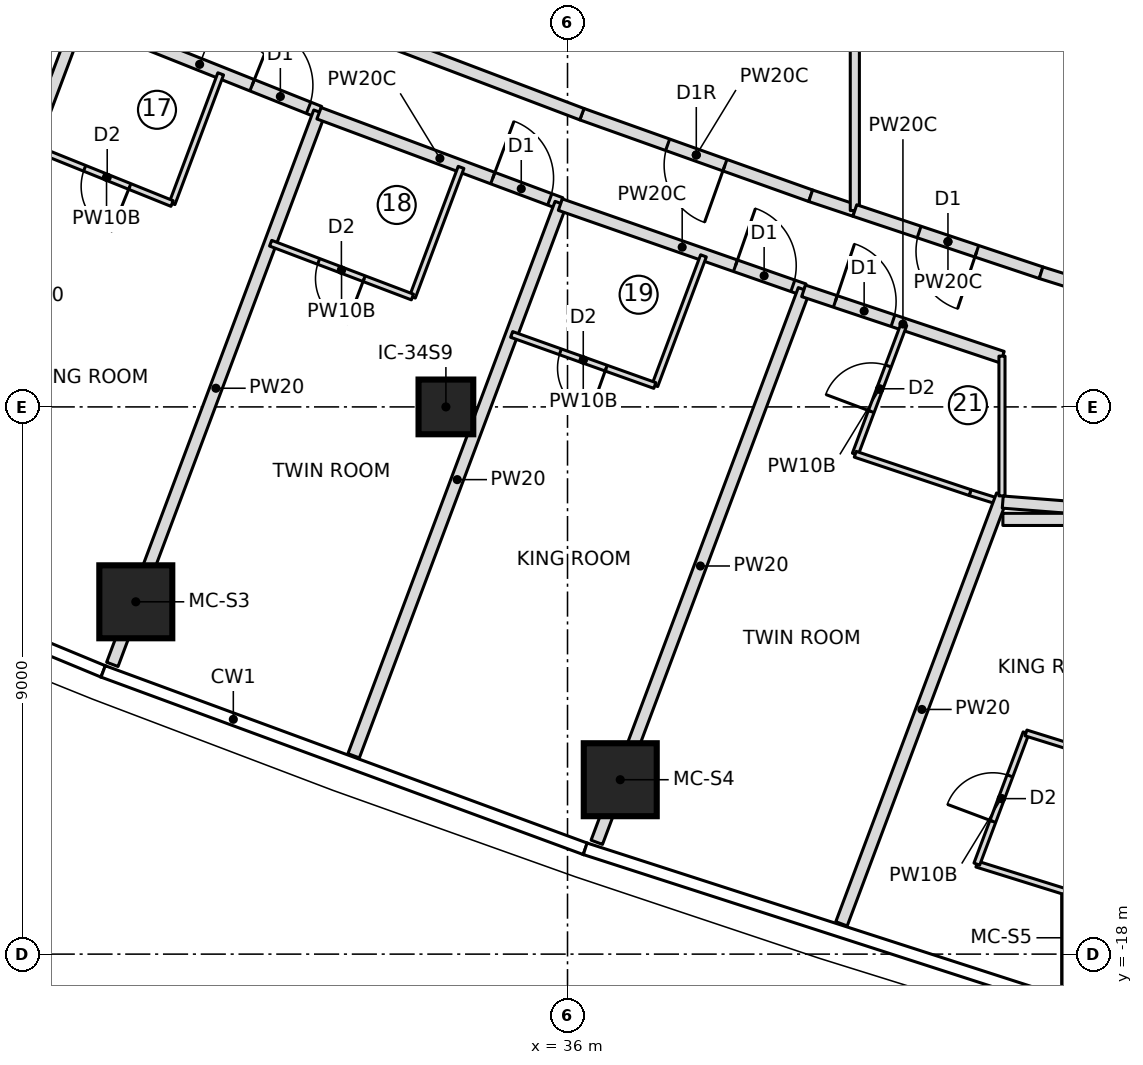
"""IFC4 building model, lengths in metres.
Left out: names, types, materials, properties, quantities, classifications, styles, units other than length and angle.
Written with IfcOpenShell. Run it as: python <this file> out.ifc"""

import sys

from ifc_helpers import new_model, si_unit, direction, frame, frame_2d, origin, origin_2d, place, context, subcontext, project, spatial, rectangle, extrude, element, fill, save


model = new_model("IFC4")
c1 = context("Model", 3, precision=1e-05, world=origin(), true_north=direction((0.0, 1.0)))
c2 = subcontext(c1, "Body", "Model", "MODEL_VIEW")
j1 = project(units=[si_unit("LENGTHUNIT", "METRE"), si_unit("PLANEANGLEUNIT", "RADIAN")], contexts=[c1])
p1 = place(None, origin())
s1 = spatial("IfcSite", under=j1, at=p1, CompositionType="ELEMENT")
p2 = place(p1, origin())
s2 = spatial("IfcBuilding", under=s1, at=p2, CompositionType="ELEMENT")
p3 = place(p2, frame((0.0, 0.0, 252.75)))
s3 = spatial("IfcBuildingStorey", under=s2, at=p3, CompositionType="ELEMENT", Elevation=252.75)
for number, where, z_axis, x_axis in (
    (1, (28.9, -12.205, 0.0), (0.0, 0.0, 1.0), (1.0, 0.0, 0.0)),
    (2, (36.867, -15.132, 0.0), (0.0, 0.0, 1.0), (1.0, 0.0, 0.0)),
):
    element("IfcColumn", number, at=place(p3, frame(where, z_axis=z_axis, x_axis=x_axis)), inside=s3, PredefinedType="COLUMN", context=c2, shape_type="SweptSolid", body=[
        extrude(rectangle(XDim=1.2, YDim=1.2, at=origin_2d()), origin(), (0.0, 0.0, 1.0), 3.55),
    ])
p4 = place(p3, frame((34.0, -9.0, 0.0), z_axis=(0.0, 0.0, 1.0), x_axis=(1.0, 0.0, 0.0)))
e3 = element("IfcColumn", 3, at=p4, inside=s3, PredefinedType="COLUMN", context=c2, shape_type="SweptSolid", body=[
    extrude(rectangle(XDim=0.9, YDim=0.9, at=origin_2d()), origin(), (0.0, 0.0, 1.0), 3.55),
])
p5 = place(p3, frame((24.578, -11.652, 0.0), z_axis=(0.0, 0.0, 1.0), x_axis=(0.351140219871, 0.936322885542, 0.0)))
e4 = element("IfcWall", 4, at=p5, inside=s3, PredefinedType="PARTITIONING", context=c2, shape_type="SweptSolid", body=[
    extrude(rectangle(XDim=9.568, YDim=0.2, at=frame_2d((4.784, 0.0))), origin(), (0.0, 0.0, 1.0), 3.15),
])
p6 = place(p3, frame((27.98, -2.581, 0.0), z_axis=(0.0, 0.0, 1.0), x_axis=(0.928920552813, -0.370279092795, 0.0)))
e5 = element("IfcWall", 5, at=p6, inside=s3, PredefinedType="PARTITIONING", context=c2, shape_type="SweptSolid", body=[
    extrude(rectangle(XDim=4.242, YDim=0.2, at=frame_2d((2.121, 0.0))), origin(), (0.0, 0.0, 1.0), 3.15),
])
p7 = place(p6, frame((3.05, 0.0, 0.0)))
e6 = element("IfcOpeningElement", 6, at=p7, cuts=e5, PredefinedType="OPENING", context=c2, shape_type="SweptSolid", body=[
    extrude(rectangle(XDim=1.0, YDim=2.1, at=frame_2d((0.5, 1.05))), frame((0.0, 0.11, 0.0), z_axis=(0.0, -1.0, 0.0), x_axis=(1.0, 0.0, 0.0)), (0.0, 0.0, 1.0), 0.22),
])
p8 = place(p3, frame((30.296, -3.522, 0.0), z_axis=(0.0, 0.0, 1.0), x_axis=(-0.351099944253, -0.936337988734, 0.0)))
e7 = element("IfcWall", 7, at=p8, inside=s3, PredefinedType="PARTITIONING", context=c2, shape_type="SweptSolid", body=[
    extrude(rectangle(XDim=2.277, YDim=0.1, at=frame_2d((1.139, 0.0))), origin(), (0.0, 0.0, 1.0), 3.15),
])
p9 = place(p3, frame((29.497, -5.655, 0.0), z_axis=(0.0, 0.0, 1.0), x_axis=(-0.927619412923, 0.373526739028, 0.0)))
e8 = element("IfcWall", 8, at=p9, inside=s3, PredefinedType="PARTITIONING", context=c2, shape_type="SweptSolid", body=[
    extrude(rectangle(XDim=2.324, YDim=0.1, at=frame_2d((1.162, 0.0))), origin(), (0.0, 0.0, 1.0), 3.15),
])
p10 = place(p9, frame((0.75, 0.0, 0.0)))
e9 = element("IfcOpeningElement", 9, at=p10, cuts=e8, PredefinedType="OPENING", context=c2, shape_type="SweptSolid", body=[
    extrude(rectangle(XDim=0.8, YDim=2.1, at=frame_2d((0.4, 1.05))), frame((0.0, 0.06, 0.0), z_axis=(0.0, -1.0, 0.0), x_axis=(1.0, 0.0, 0.0)), (0.0, 0.0, 1.0), 0.12),
])
p11 = place(p3, frame((28.514, -13.235, 0.0), z_axis=(0.0, 0.0, 1.0), x_axis=(0.351126199585, 0.936328143316, 0.0)))
e10 = element("IfcWall", 10, at=p11, inside=s3, PredefinedType="PARTITIONING", context=c2, shape_type="SweptSolid", body=[
    extrude(rectangle(XDim=9.701, YDim=0.2, at=frame_2d((4.851, 0.0))), origin(), (0.0, 0.0, 1.0), 3.15),
])
p12 = place(p3, frame((31.913, -4.17, 0.0), z_axis=(0.0, 0.0, 1.0), x_axis=(0.936848300955, -0.349735987565, 0.0)))
e11 = element("IfcWall", 11, at=p12, inside=s3, PredefinedType="PARTITIONING", context=c2, shape_type="SweptSolid", body=[
    extrude(rectangle(XDim=4.244, YDim=0.2, at=frame_2d((2.122, 0.0))), origin(), (0.0, 0.0, 1.0), 3.15),
])
p13 = place(p12, frame((3.05, 0.0, 0.0)))
e12 = element("IfcOpeningElement", 12, at=p13, cuts=e11, PredefinedType="OPENING", context=c2, shape_type="SweptSolid", body=[
    extrude(rectangle(XDim=1.0, YDim=2.1, at=frame_2d((0.5, 1.05))), frame((0.0, 0.11, 0.0), z_axis=(0.0, -1.0, 0.0), x_axis=(1.0, 0.0, 0.0)), (0.0, 0.0, 1.0), 0.22),
])
p14 = place(p3, frame((34.25, -5.061, 0.0), z_axis=(0.0, 0.0, 1.0), x_axis=(-0.351135191353, -0.936324771323, 0.0)))
e13 = element("IfcWall", 13, at=p14, inside=s3, PredefinedType="PARTITIONING", context=c2, shape_type="SweptSolid", body=[
    extrude(rectangle(XDim=2.277, YDim=0.1, at=frame_2d((1.139, 0.0))), origin(), (0.0, 0.0, 1.0), 3.15),
])
p15 = place(p3, frame((33.45, -7.193, 0.0), z_axis=(0.0, 0.0, 1.0), x_axis=(-0.93495051617, 0.354778145202, 0.0)))
e14 = element("IfcWall", 14, at=p15, inside=s3, PredefinedType="PARTITIONING", context=c2, shape_type="SweptSolid", body=[
    extrude(rectangle(XDim=2.495, YDim=0.1, at=frame_2d((1.247, 0.0))), origin(), (0.0, 0.0, 1.0), 3.15),
])
p16 = place(p15, frame((0.85, 0.0, 0.0)))
e15 = element("IfcOpeningElement", 15, at=p16, cuts=e14, PredefinedType="OPENING", context=c2, shape_type="SweptSolid", body=[
    extrude(rectangle(XDim=0.8, YDim=2.1, at=frame_2d((0.4, 1.05))), frame((0.0, 0.06, 0.0), z_axis=(0.0, -1.0, 0.0), x_axis=(1.0, 0.0, 0.0)), (0.0, 0.0, 1.0), 0.12),
])
p17 = place(p3, frame((32.483, -14.738, 0.0), z_axis=(0.0, 0.0, 1.0), x_axis=(0.351117925717, 0.936331246002, 0.0)))
e16 = element("IfcWall", 16, at=p17, inside=s3, PredefinedType="PARTITIONING", context=c2, shape_type="SweptSolid", body=[
    extrude(rectangle(XDim=9.701, YDim=0.2, at=frame_2d((4.851, 0.0))), origin(), (0.0, 0.0, 1.0), 3.15),
])
p18 = place(p3, frame((35.882, -5.673, 0.0), z_axis=(0.0, 0.0, 1.0), x_axis=(0.944107376821, -0.329638075823, 0.0)))
e17 = element("IfcWall", 17, at=p18, inside=s3, PredefinedType="PARTITIONING", context=c2, shape_type="SweptSolid", body=[
    extrude(rectangle(XDim=4.245, YDim=0.2, at=frame_2d((2.122, 0.0))), origin(), (0.0, 0.0, 1.0), 3.15),
])
p19 = place(p18, frame((3.05, 0.0, 0.0)))
e18 = element("IfcOpeningElement", 18, at=p19, cuts=e17, PredefinedType="OPENING", context=c2, shape_type="SweptSolid", body=[
    extrude(rectangle(XDim=1.0, YDim=2.1, at=frame_2d((0.5, 1.05))), frame((0.0, 0.11, 0.0), z_axis=(0.0, -1.0, 0.0), x_axis=(1.0, 0.0, 0.0)), (0.0, 0.0, 1.0), 0.22),
])
p20 = place(p3, frame((38.236, -6.516, 0.0), z_axis=(0.0, 0.0, 1.0), x_axis=(-0.351229183496, -0.936289517543, 0.0)))
e19 = element("IfcWall", 19, at=p20, inside=s3, PredefinedType="PARTITIONING", context=c2, shape_type="SweptSolid", body=[
    extrude(rectangle(XDim=2.277, YDim=0.1, at=frame_2d((1.139, 0.0))), origin(), (0.0, 0.0, 1.0), 3.15),
])
p21 = place(p3, frame((37.436, -8.648, 0.0), z_axis=(0.0, 0.0, 1.0), x_axis=(-0.941896455552, 0.335903359641, 0.0)))
e20 = element("IfcWall", 20, at=p21, inside=s3, PredefinedType="PARTITIONING", context=c2, shape_type="SweptSolid", body=[
    extrude(rectangle(XDim=2.5, YDim=0.1, at=frame_2d((1.25, 0.0))), origin(), (0.0, 0.0, 1.0), 3.15),
])
p22 = place(p21, frame((0.85, 0.0, 0.0)))
e21 = element("IfcOpeningElement", 21, at=p22, cuts=e20, PredefinedType="OPENING", context=c2, shape_type="SweptSolid", body=[
    extrude(rectangle(XDim=0.8, YDim=2.1, at=frame_2d((0.4, 1.05))), frame((0.0, 0.06, 0.0), z_axis=(0.0, -1.0, 0.0), x_axis=(1.0, 0.0, 0.0)), (0.0, 0.0, 1.0), 0.12),
])
p23 = place(p3, frame((36.481, -16.161, 0.0), z_axis=(0.0, 0.0, 1.0), x_axis=(0.35112895446, 0.936327110224, 0.0)))
e22 = element("IfcWall", 22, at=p23, inside=s3, PredefinedType="PARTITIONING", context=c2, shape_type="SweptSolid", body=[
    extrude(rectangle(XDim=9.706, YDim=0.2, at=frame_2d((4.853, 0.0))), origin(), (0.0, 0.0, 1.0), 3.15),
])
p24 = place(p3, frame((39.882, -7.091, 0.0), z_axis=(0.0, 0.0, 1.0), x_axis=(0.948477584784, -0.316844238013, 0.0)))
e23 = element("IfcWall", 23, at=p24, inside=s3, PredefinedType="PARTITIONING", context=c2, shape_type="SweptSolid", body=[
    extrude(rectangle(XDim=3.445, YDim=0.2, at=frame_2d((1.723, 0.0))), origin(), (0.0, 0.0, 1.0), 3.15),
])
p25 = place(p24, frame((0.55, 0.0, 0.0)))
e24 = element("IfcOpeningElement", 24, at=p25, cuts=e23, PredefinedType="OPENING", context=c2, shape_type="SweptSolid", body=[
    extrude(rectangle(XDim=1.0, YDim=2.1, at=frame_2d((0.5, 1.05))), frame((0.0, 0.11, 0.0), z_axis=(0.0, -1.0, 0.0), x_axis=(1.0, 0.0, 0.0)), (0.0, 0.0, 1.0), 0.22),
])
p26 = place(p3, frame((40.732, -9.779, 0.0), z_axis=(0.0, 0.0, 1.0), x_axis=(0.351146927505, 0.936320370014, 0.0)))
e25 = element("IfcWall", 25, at=p26, inside=s3, PredefinedType="PARTITIONING", context=c2, shape_type="SweptSolid", body=[
    extrude(rectangle(XDim=2.278, YDim=0.1, at=frame_2d((1.139, 0.0))), origin(), (0.0, 0.0, 1.0), 3.15),
])
p27 = place(p26, frame((0.75, 0.0, 0.0)))
e26 = element("IfcOpeningElement", 26, at=p27, cuts=e25, PredefinedType="OPENING", context=c2, shape_type="SweptSolid", body=[
    extrude(rectangle(XDim=0.8, YDim=2.1, at=frame_2d((0.4, 1.05))), frame((0.0, 0.06, 0.0), z_axis=(0.0, -1.0, 0.0), x_axis=(1.0, 0.0, 0.0)), (0.0, 0.0, 1.0), 0.12),
])
p28 = place(p3, frame((43.108, -10.562, 0.0), z_axis=(0.0, 0.0, 1.0), x_axis=(-0.954624465478, 0.297812239356, 0.0)))
e27 = element("IfcWall", 27, at=p28, inside=s3, PredefinedType="PARTITIONING", context=c2, shape_type="SweptSolid", body=[
    extrude(rectangle(XDim=0.511, YDim=0.1, at=frame_2d((0.255, 0.0))), origin(), (0.0, 0.0, 1.0), 3.15),
])
p29 = place(p3, frame((42.621, -10.409, 0.0), z_axis=(0.0, 0.0, 1.0), x_axis=(-0.948499248693, 0.316779379426, 0.0)))
e28 = element("IfcWall", 28, at=p29, inside=s3, PredefinedType="PARTITIONING", context=c2, shape_type="SweptSolid", body=[
    extrude(rectangle(XDim=1.991, YDim=0.1, at=frame_2d((0.996, 0.0))), origin(), (0.0, 0.0, 1.0), 3.15),
])
p30 = place(p3, frame((40.506, -17.501, 0.0), z_axis=(0.0, 0.0, 1.0), x_axis=(0.351119888923, 0.936330509811, 0.0)))
e29 = element("IfcWall", 29, at=p30, inside=s3, PredefinedType="PARTITIONING", context=c2, shape_type="SweptSolid", body=[
    extrude(rectangle(XDim=7.531, YDim=0.2, at=frame_2d((3.766, 0.0))), origin(), (0.0, 0.0, 1.0), 3.15),
])
p31 = place(p3, frame((44.177, -18.501, 0.0), z_axis=(0.0, 0.0, 1.0), x_axis=(0.0, 1.0, 0.0)))
e30 = element("IfcWall", 30, at=p31, inside=s3, PredefinedType="PARTITIONING", context=c2, shape_type="SweptSolid", body=[
    extrude(rectangle(XDim=1.531, YDim=0.1, at=frame_2d((0.766, 0.0))), origin(), (0.0, 0.0, 1.0), 3.15),
])
p32 = place(p3, frame((44.177, -16.97, 0.0), z_axis=(0.0, 0.0, 1.0), x_axis=(-0.954631901927, 0.297788401091, 0.0)))
e31 = element("IfcWall", 31, at=p32, inside=s3, PredefinedType="PARTITIONING", context=c2, shape_type="SweptSolid", body=[
    extrude(rectangle(XDim=1.514, YDim=0.1, at=frame_2d((0.757, 0.0))), origin(), (0.0, 0.0, 1.0), 3.15),
])
p33 = place(p3, frame((42.731, -16.519, 0.0), z_axis=(0.0, 0.0, 1.0), x_axis=(0.351111827312, 0.936333532841, 0.0)))
e32 = element("IfcWall", 32, at=p33, inside=s3, PredefinedType="PARTITIONING", context=c2, shape_type="SweptSolid", body=[
    extrude(rectangle(XDim=2.304, YDim=0.1, at=frame_2d((1.152, 0.0))), origin(), (0.0, 0.0, 1.0), 3.15),
])
p34 = place(p33, frame((0.75, 0.0, 0.0)))
e33 = element("IfcOpeningElement", 33, at=p34, cuts=e32, PredefinedType="OPENING", context=c2, shape_type="SweptSolid", body=[
    extrude(rectangle(XDim=0.8, YDim=2.1, at=frame_2d((0.4, 1.05))), frame((0.0, 0.06, 0.0), z_axis=(0.0, -1.0, 0.0), x_axis=(1.0, 0.0, 0.0)), (0.0, 0.0, 1.0), 0.12),
])
p35 = place(p3, frame((43.54, -14.362, 0.0), z_axis=(0.0, 0.0, 1.0), x_axis=(0.954642821531, -0.297753393432, 0.0)))
e34 = element("IfcWall", 34, at=p35, inside=s3, PredefinedType="PARTITIONING", context=c2, shape_type="SweptSolid", body=[
    extrude(rectangle(XDim=2.052, YDim=0.1, at=frame_2d((1.026, 0.0))), origin(), (0.0, 0.0, 1.0), 3.15),
])
p36 = place(p3, frame((39.999, -5.527, 0.0), z_axis=(0.0, 0.0, 1.0), x_axis=(-0.941909090846, 0.335867927288, 0.0)))
e35 = element("IfcWall", 35, at=p36, inside=s3, PredefinedType="PARTITIONING", context=c2, shape_type="SweptSolid", body=[
    extrude(rectangle(XDim=3.995, YDim=0.2, at=frame_2d((1.998, 0.0))), origin(), (0.0, 0.0, 1.0), 3.15),
])
p37 = place(p36, frame((1.498, 0.0, 0.0)))
e36 = element("IfcOpeningElement", 36, at=p37, cuts=e35, PredefinedType="OPENING", context=c2, shape_type="SweptSolid", body=[
    extrude(rectangle(XDim=1.0, YDim=2.1, at=frame_2d((0.5, 1.05))), frame((0.0, 0.11, 0.0), z_axis=(0.0, -1.0, 0.0), x_axis=(1.0, 0.0, 0.0)), (0.0, 0.0, 1.0), 0.22),
])
p38 = place(p3, frame((40.725, -5.77, 0.0), z_axis=(0.0, 0.0, 1.0), x_axis=(-0.948395804395, 0.317088943683, 0.0)))
e37 = element("IfcWall", 37, at=p38, inside=s3, PredefinedType="PARTITIONING", context=c2, shape_type="SweptSolid", body=[
    extrude(rectangle(XDim=0.765, YDim=0.2, at=frame_2d((0.383, 0.0))), origin(), (0.0, 0.0, 1.0), 3.15),
])
p39 = place(p3, frame((36.236, -4.186, 0.0), z_axis=(0.0, 0.0, 1.0), x_axis=(-0.934953584606, 0.354770058816, 0.0)))
e38 = element("IfcWall", 38, at=p39, inside=s3, PredefinedType="PARTITIONING", context=c2, shape_type="SweptSolid", body=[
    extrude(rectangle(XDim=3.622, YDim=0.2, at=frame_2d((1.811, 0.0))), origin(), (0.0, 0.0, 1.0), 3.15),
])
p40 = place(p3, frame((40.725, -5.77, 0.0), z_axis=(0.0, 0.0, 1.0), x_axis=(0.0, 1.0, 0.0)))
e39 = element("IfcWall", 39, at=p40, inside=s3, PredefinedType="PARTITIONING", context=c2, shape_type="SweptSolid", body=[
    extrude(rectangle(XDim=11.54, YDim=0.15, at=frame_2d((5.77, 0.0))), origin(), (0.0, 0.0, 1.0), 3.15),
])
p41 = place(p3, frame((43.788, -6.793, 0.0), z_axis=(0.0, 0.0, 1.0), x_axis=(-0.948486568618, 0.316817343515, 0.0)))
e40 = element("IfcWall", 40, at=p41, inside=s3, PredefinedType="PARTITIONING", context=c2, shape_type="SweptSolid", body=[
    extrude(rectangle(XDim=3.229, YDim=0.2, at=frame_2d((1.615, 0.0))), origin(), (0.0, 0.0, 1.0), 3.15),
])
p42 = place(p41, frame((1.115, 0.0, 0.0)))
e41 = element("IfcOpeningElement", 41, at=p42, cuts=e40, PredefinedType="OPENING", context=c2, shape_type="SweptSolid", body=[
    extrude(rectangle(XDim=1.0, YDim=2.1, at=frame_2d((0.5, 1.05))), frame((0.0, 0.11, 0.0), z_axis=(0.0, -1.0, 0.0), x_axis=(1.0, 0.0, 0.0)), (0.0, 0.0, 1.0), 0.22),
])
p43 = place(p3, frame((44.933, -7.15, 0.0), z_axis=(0.0, 0.0, 1.0), x_axis=(-0.954693570678, 0.29759063511, 0.0)))
e42 = element("IfcWall", 42, at=p43, inside=s3, PredefinedType="PARTITIONING", context=c2, shape_type="SweptSolid", body=[
    extrude(rectangle(XDim=1.198, YDim=0.2, at=frame_2d((0.599, 0.0))), origin(), (0.0, 0.0, 1.0), 3.15),
])
p44 = place(p3, frame((43.145, -8.165, 0.0), z_axis=(0.0, 0.0, 1.0), x_axis=(0.0, -1.0, 0.0)))
e43 = element("IfcWall", 43, at=p44, inside=s3, PredefinedType="PARTITIONING", context=c2, shape_type="SweptSolid", body=[
    extrude(rectangle(XDim=2.298, YDim=0.1, at=frame_2d((1.149, 0.0))), origin(), (0.0, 0.0, 1.0), 3.15),
])
p45 = place(p3, frame((43.158, -10.565, 0.0), z_axis=(0.0, 0.0, 1.0), x_axis=(0.996940593543, -0.078162989617, 0.0)))
e44 = element("IfcWall", 44, at=p45, inside=s3, PredefinedType="PARTITIONING", context=c2, shape_type="SweptSolid", body=[
    extrude(rectangle(XDim=3.704, YDim=0.2, at=frame_2d((1.852, 0.0))), origin(), (0.0, 0.0, 1.0), 3.15),
])
p46 = place(p45, frame((1.327, 0.0, 0.0)))
e45 = element("IfcOpeningElement", 45, at=p46, cuts=e44, PredefinedType="OPENING", context=c2, shape_type="SweptSolid", body=[
    extrude(rectangle(XDim=1.0, YDim=2.1, at=frame_2d((0.5, 1.05))), frame((0.0, 0.11, 0.0), z_axis=(0.0, -1.0, 0.0), x_axis=(1.0, 0.0, 0.0)), (0.0, 0.0, 1.0), 0.22),
])
p47 = place(p3, frame((44.396, -10.85, 0.0), z_axis=(0.0, 0.0, 1.0), x_axis=(-1.0, 0.0, 0.0)))
e46 = element("IfcWall", 46, at=p47, inside=s3, PredefinedType="PARTITIONING", context=c2, shape_type="SweptSolid", body=[
    extrude(rectangle(XDim=1.236, YDim=0.2, at=frame_2d((0.618, 0.0))), origin(), (0.0, 0.0, 1.0), 3.15),
])
p48 = place(p10, origin())
e47 = element("IfcDoor", 47, at=p48, inside=s3, OperationType="SINGLE_SWING_LEFT", PredefinedType="DOOR", context=c2, shape_type="SweptSolid", body=[
    extrude(rectangle(XDim=0.8, YDim=2.1, at=frame_2d((0.4, 1.05))), frame((0.0, 0.025, 0.0), z_axis=(0.0, -1.0, 0.0), x_axis=(1.0, 0.0, 0.0)), (0.0, 0.0, 1.0), 0.05),
])
fill(e9, e47)
p49 = place(p7, origin())
e48 = element("IfcDoor", 48, at=p49, inside=s3, OperationType="SINGLE_SWING_LEFT", PredefinedType="DOOR", context=c2, shape_type="SweptSolid", body=[
    extrude(rectangle(XDim=1.0, YDim=2.1, at=frame_2d((0.5, 1.05))), frame((0.0, 0.025, 0.0), z_axis=(0.0, -1.0, 0.0), x_axis=(1.0, 0.0, 0.0)), (0.0, 0.0, 1.0), 0.05),
])
fill(e6, e48)
p50 = place(p16, origin())
e49 = element("IfcDoor", 49, at=p50, inside=s3, OperationType="SINGLE_SWING_LEFT", PredefinedType="DOOR", context=c2, shape_type="SweptSolid", body=[
    extrude(rectangle(XDim=0.8, YDim=2.1, at=frame_2d((0.4, 1.05))), frame((0.0, 0.025, 0.0), z_axis=(0.0, -1.0, 0.0), x_axis=(1.0, 0.0, 0.0)), (0.0, 0.0, 1.0), 0.05),
])
fill(e15, e49)
p51 = place(p13, origin())
e50 = element("IfcDoor", 50, at=p51, inside=s3, OperationType="SINGLE_SWING_LEFT", PredefinedType="DOOR", context=c2, shape_type="SweptSolid", body=[
    extrude(rectangle(XDim=1.0, YDim=2.1, at=frame_2d((0.5, 1.05))), frame((0.0, 0.025, 0.0), z_axis=(0.0, -1.0, 0.0), x_axis=(1.0, 0.0, 0.0)), (0.0, 0.0, 1.0), 0.05),
])
fill(e12, e50)
p52 = place(p22, origin())
e51 = element("IfcDoor", 51, at=p52, inside=s3, OperationType="SINGLE_SWING_LEFT", PredefinedType="DOOR", context=c2, shape_type="SweptSolid", body=[
    extrude(rectangle(XDim=0.8, YDim=2.1, at=frame_2d((0.4, 1.05))), frame((0.0, 0.025, 0.0), z_axis=(0.0, -1.0, 0.0), x_axis=(1.0, 0.0, 0.0)), (0.0, 0.0, 1.0), 0.05),
])
fill(e21, e51)
p53 = place(p19, origin())
e52 = element("IfcDoor", 52, at=p53, inside=s3, OperationType="SINGLE_SWING_LEFT", PredefinedType="DOOR", context=c2, shape_type="SweptSolid", body=[
    extrude(rectangle(XDim=1.0, YDim=2.1, at=frame_2d((0.5, 1.05))), frame((0.0, 0.025, 0.0), z_axis=(0.0, -1.0, 0.0), x_axis=(1.0, 0.0, 0.0)), (0.0, 0.0, 1.0), 0.05),
])
fill(e18, e52)
p54 = place(p27, origin())
e53 = element("IfcDoor", 53, at=p54, inside=s3, OperationType="SINGLE_SWING_LEFT", PredefinedType="DOOR", context=c2, shape_type="SweptSolid", body=[
    extrude(rectangle(XDim=0.8, YDim=2.1, at=frame_2d((0.4, 1.05))), frame((0.0, 0.025, 0.0), z_axis=(0.0, -1.0, 0.0), x_axis=(1.0, 0.0, 0.0)), (0.0, 0.0, 1.0), 0.05),
])
fill(e26, e53)
p55 = place(p25, origin())
e54 = element("IfcDoor", 54, at=p55, inside=s3, OperationType="SINGLE_SWING_LEFT", PredefinedType="DOOR", context=c2, shape_type="SweptSolid", body=[
    extrude(rectangle(XDim=1.0, YDim=2.1, at=frame_2d((0.5, 1.05))), frame((0.0, 0.025, 0.0), z_axis=(0.0, -1.0, 0.0), x_axis=(1.0, 0.0, 0.0)), (0.0, 0.0, 1.0), 0.05),
])
fill(e24, e54)
p56 = place(p34, origin())
e55 = element("IfcDoor", 55, at=p56, inside=s3, OperationType="SINGLE_SWING_LEFT", PredefinedType="DOOR", context=c2, shape_type="SweptSolid", body=[
    extrude(rectangle(XDim=0.8, YDim=2.1, at=frame_2d((0.4, 1.05))), frame((0.0, 0.025, 0.0), z_axis=(0.0, -1.0, 0.0), x_axis=(1.0, 0.0, 0.0)), (0.0, 0.0, 1.0), 0.05),
])
fill(e33, e55)
p57 = place(p37, origin())
e56 = element("IfcDoor", 56, at=p57, inside=s3, OperationType="SINGLE_SWING_RIGHT", PredefinedType="DOOR", context=c2, shape_type="SweptSolid", body=[
    extrude(rectangle(XDim=1.0, YDim=2.1, at=frame_2d((0.5, 1.05))), frame((0.0, 0.025, 0.0), z_axis=(0.0, -1.0, 0.0), x_axis=(1.0, 0.0, 0.0)), (0.0, 0.0, 1.0), 0.05),
])
fill(e36, e56)
p58 = place(p42, origin())
e57 = element("IfcDoor", 57, at=p58, inside=s3, OperationType="SINGLE_SWING_LEFT", PredefinedType="DOOR", context=c2, shape_type="SweptSolid", body=[
    extrude(rectangle(XDim=1.0, YDim=2.1, at=frame_2d((0.5, 1.05))), frame((0.0, 0.025, 0.0), z_axis=(0.0, -1.0, 0.0), x_axis=(1.0, 0.0, 0.0)), (0.0, 0.0, 1.0), 0.05),
])
fill(e41, e57)
save(model, sys.argv[1])
